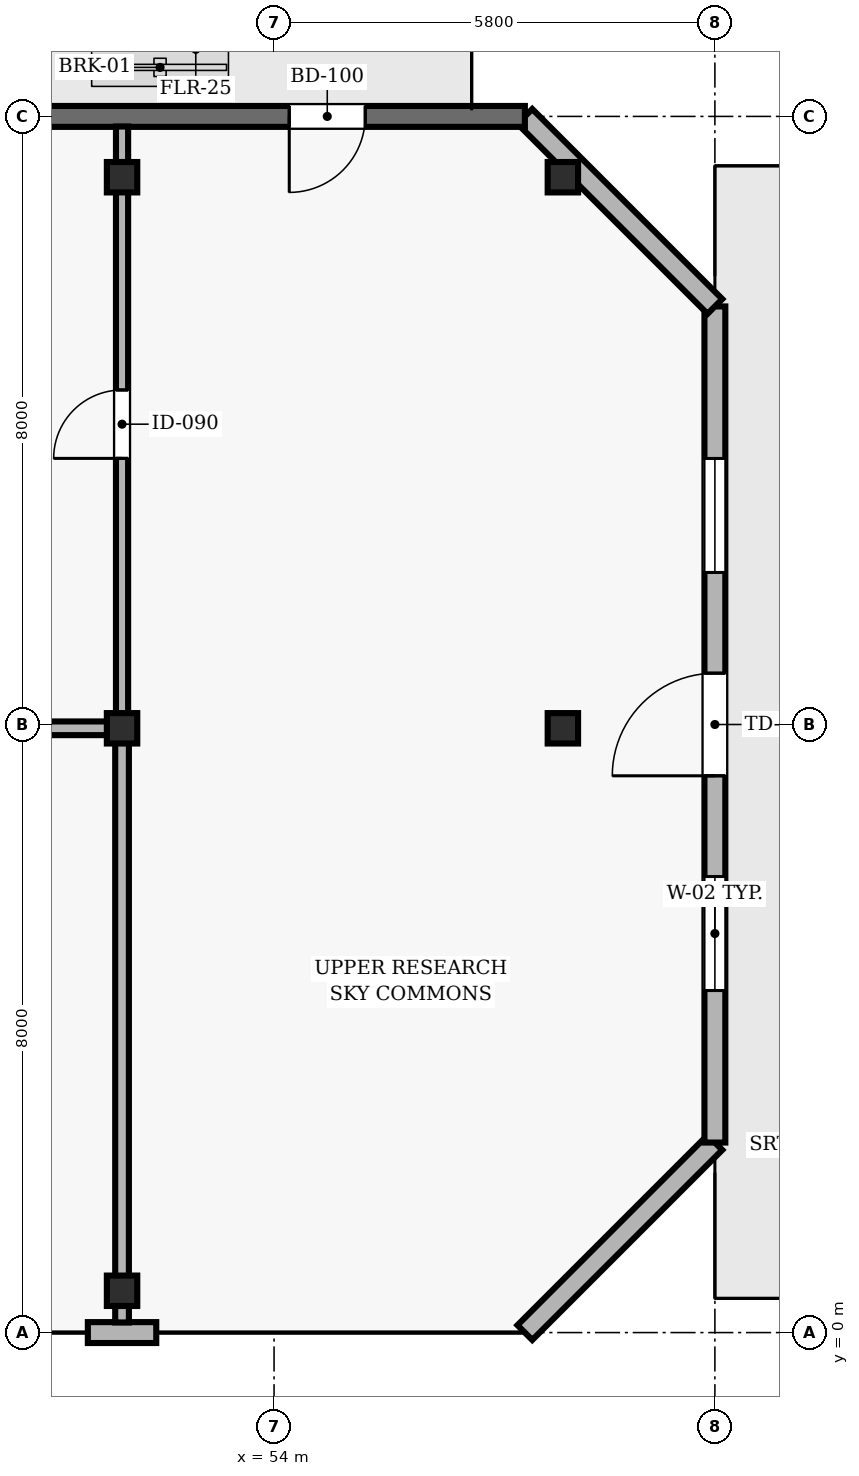
"""IFC4 building model, lengths in metres.
Left out: names, types, materials, properties, quantities, classifications, styles, units other than length and angle.
Written with IfcOpenShell. Run it as: python <this file> out.ifc"""

import sys

from ifc_helpers import new_model, si_unit, direction, frame, frame_2d, origin, origin_2d, place, context, subcontext, project, spatial, rectangle, hollow_rectangle, extrude, element, fill, save


model = new_model("IFC4")
c1 = context("Model", 3, precision=1e-05, world=origin(), true_north=direction((0.0, 1.0)))
c2 = subcontext(c1, "Body", "Model", "MODEL_VIEW")
j1 = project(units=[si_unit("LENGTHUNIT", "METRE"), si_unit("PLANEANGLEUNIT", "RADIAN")], contexts=[c1])
p1 = place(None, origin())
s1 = spatial("IfcSite", under=j1, at=p1, CompositionType="ELEMENT")
p2 = place(p1, origin())
s2 = spatial("IfcBuilding", under=s1, at=p2, CompositionType="ELEMENT")
p3 = place(p2, frame((0.0, 0.0, 243.2)))
s3 = spatial("IfcBuildingStorey", under=s2, at=p3, CompositionType="ELEMENT", Elevation=243.2)
for number, where, z_axis, x_axis in (
    (1, (52.0, 0.55, 0.0), (0.0, 0.0, 1.0), (1.0, 0.0, 0.0)),
    (2, (52.0, 7.95, 0.0), (0.0, 0.0, 1.0), (1.0, 0.0, 0.0)),
    (3, (52.0, 15.2, 0.0), (0.0, 0.0, 1.0), (1.0, 0.0, 0.0)),
    (4, (57.8, 7.95, 0.0), (0.0, 0.0, 1.0), (1.0, 0.0, 0.0)),
    (5, (57.8, 15.2, 0.0), (0.0, 0.0, 1.0), (1.0, 0.0, 0.0)),
):
    element("IfcColumn", number, at=place(p3, frame(where, z_axis=z_axis, x_axis=x_axis)), inside=s3, PredefinedType="COLUMN", context=c2, shape_type="SweptSolid", body=[
        extrude(hollow_rectangle(XDim=0.4, YDim=0.4, WallThickness=0.02, at=origin_2d()), origin(), (0.0, 0.0, 1.0), 5.0),
    ])
p4 = place(p3, frame((51.55, 0.0, 0.0), z_axis=(0.0, 0.0, 1.0), x_axis=(1.0, 0.0, 0.0)))
e6 = element("IfcWall", 6, at=p4, inside=s3, PredefinedType="SOLIDWALL", context=c2, shape_type="SweptSolid", body=[
    extrude(rectangle(XDim=0.9, YDim=0.275, at=frame_2d((0.45, 0.0))), origin(), (0.0, 0.0, 1.0), 4.79),
])
p5 = place(p3, frame((57.3, 0.0, 0.0), z_axis=(0.0, 0.0, 1.0), x_axis=(0.707106781187, 0.707106781187, 0.0)))
e7 = element("IfcWall", 7, at=p5, inside=s3, PredefinedType="SOLIDWALL", context=c2, shape_type="SweptSolid", body=[
    extrude(rectangle(XDim=3.536, YDim=0.275, at=frame_2d((1.768, 0.0))), origin(), (0.0, 0.0, 1.0), 4.79),
])
p6 = place(p3, frame((59.8, 2.5, 0.0), z_axis=(0.0, 0.0, 1.0), x_axis=(0.0, 1.0, 0.0)))
e8 = element("IfcWall", 8, at=p6, inside=s3, PredefinedType="SOLIDWALL", context=c2, shape_type="SweptSolid", body=[
    extrude(rectangle(XDim=11.0, YDim=0.275, at=frame_2d((5.5, 0.0))), origin(), (0.0, 0.0, 1.0), 4.79),
])
p7 = place(p6, frame((4.825, 0.0, 0.0)))
e9 = element("IfcOpeningElement", 9, at=p7, cuts=e8, PredefinedType="OPENING", context=c2, shape_type="SweptSolid", body=[
    extrude(rectangle(XDim=1.35, YDim=2.2, at=frame_2d((0.675, 1.1))), frame((0.0, 0.147, 0.0), z_axis=(0.0, -1.0, 0.0), x_axis=(1.0, 0.0, 0.0)), (0.0, 0.0, 1.0), 0.295),
])
p8 = place(p6, frame((2.0, 0.0, 0.9)))
e10 = element("IfcOpeningElement", 10, at=p8, cuts=e8, PredefinedType="OPENING", context=c2, shape_type="SweptSolid", body=[
    extrude(rectangle(XDim=1.5, YDim=1.6, at=frame_2d((0.75, 0.8))), frame((0.0, 0.147, 0.0), z_axis=(0.0, -1.0, 0.0), x_axis=(1.0, 0.0, 0.0)), (0.0, 0.0, 1.0), 0.295),
])
p9 = place(p6, frame((7.5, 0.0, 0.9)))
e11 = element("IfcOpeningElement", 11, at=p9, cuts=e8, PredefinedType="OPENING", context=c2, shape_type="SweptSolid", body=[
    extrude(rectangle(XDim=1.5, YDim=1.6, at=frame_2d((0.75, 0.8))), frame((0.0, 0.147, 0.0), z_axis=(0.0, -1.0, 0.0), x_axis=(1.0, 0.0, 0.0)), (0.0, 0.0, 1.0), 0.295),
])
p10 = place(p3, frame((59.8, 13.5, 0.0), z_axis=(0.0, 0.0, 1.0), x_axis=(-0.707106781187, 0.707106781187, 0.0)))
e12 = element("IfcWall", 12, at=p10, inside=s3, PredefinedType="SOLIDWALL", context=c2, shape_type="SweptSolid", body=[
    extrude(rectangle(XDim=3.536, YDim=0.275, at=frame_2d((1.768, 0.0))), origin(), (0.0, 0.0, 1.0), 4.79),
])
p11 = place(p3, frame((57.3, 16.0, 0.0), z_axis=(0.0, 0.0, 1.0), x_axis=(-1.0, 0.0, 0.0)))
e13 = element("IfcWall", 13, at=p11, inside=s3, PredefinedType="SOLIDWALL", context=c2, shape_type="SweptSolid", body=[
    extrude(rectangle(XDim=9.8, YDim=0.275, at=frame_2d((4.9, 0.0))), origin(), (0.0, 0.0, 1.0), 4.79),
])
p12 = place(p11, frame((2.1, 0.0, 0.0)))
e14 = element("IfcOpeningElement", 14, at=p12, cuts=e13, PredefinedType="OPENING", context=c2, shape_type="SweptSolid", body=[
    extrude(rectangle(XDim=1.0, YDim=2.2, at=frame_2d((0.5, 1.1))), frame((0.0, 0.147, 0.0), z_axis=(0.0, -1.0, 0.0), x_axis=(1.0, 0.0, 0.0)), (0.0, 0.0, 1.0), 0.295),
])
p13 = place(p3, frame((38.05, 7.95, 0.0), z_axis=(0.0, 0.0, 1.0), x_axis=(1.0, 0.0, 0.0)))
e15 = element("IfcWall", 15, at=p13, inside=s3, PredefinedType="PARTITIONING", context=c2, shape_type="SweptSolid", body=[
    extrude(rectangle(XDim=13.95, YDim=0.18, at=frame_2d((6.975, 0.0))), origin(), (0.0, 0.0, 1.0), 4.327),
])
p14 = place(p13, frame((5.45, 0.0, 0.0)))
e16 = element("IfcOpeningElement", 16, at=p14, cuts=e15, PredefinedType="OPENING", context=c2, shape_type="SweptSolid", body=[
    extrude(rectangle(XDim=0.95, YDim=2.1, at=frame_2d((0.475, 1.05))), frame((0.0, 0.1, 0.0), z_axis=(0.0, -1.0, 0.0), x_axis=(1.0, 0.0, 0.0)), (0.0, 0.0, 1.0), 0.2),
])
p15 = place(p3, frame((52.0, 7.865, 0.0), z_axis=(0.0, 0.0, 1.0), x_axis=(0.0, -1.0, 0.0)))
e17 = element("IfcWall", 17, at=p15, inside=s3, PredefinedType="PARTITIONING", context=c2, shape_type="SweptSolid", body=[
    extrude(rectangle(XDim=7.732, YDim=0.18, at=frame_2d((3.866, 0.0))), origin(), (0.0, 0.0, 1.0), 4.327),
])
p16 = place(p3, frame((52.0, 8.035, 0.0), z_axis=(0.0, 0.0, 1.0), x_axis=(0.0, 1.0, 0.0)))
e18 = element("IfcWall", 18, at=p16, inside=s3, PredefinedType="PARTITIONING", context=c2, shape_type="SweptSolid", body=[
    extrude(rectangle(XDim=7.832, YDim=0.16, at=frame_2d((3.916, 0.0))), origin(), (0.0, 0.0, 1.0), 4.327),
])
p17 = place(p16, frame((3.466, 0.0, 0.0)))
e19 = element("IfcOpeningElement", 19, at=p17, cuts=e18, PredefinedType="OPENING", context=c2, shape_type="SweptSolid", body=[
    extrude(rectangle(XDim=0.9, YDim=2.1, at=frame_2d((0.45, 1.05))), frame((0.0, 0.09, 0.0), z_axis=(0.0, -1.0, 0.0), x_axis=(1.0, 0.0, 0.0)), (0.0, 0.0, 1.0), 0.18),
])
p18 = place(p7, origin())
e20 = element("IfcDoor", 20, at=p18, inside=s3, OperationType="SINGLE_SWING_LEFT", PredefinedType="DOOR", context=c2, shape_type="SweptSolid", body=[
    extrude(rectangle(XDim=1.35, YDim=2.2, at=frame_2d((0.675, 1.1))), frame((0.0, 0.025, 0.0), z_axis=(0.0, -1.0, 0.0), x_axis=(1.0, 0.0, 0.0)), (0.0, 0.0, 1.0), 0.05),
])
fill(e9, e20)
p19 = place(p8, origin())
e21 = element("IfcWindow", 21, at=p19, inside=s3, PartitioningType="SINGLE_PANEL", PredefinedType="WINDOW", context=c2, shape_type="SweptSolid", body=[
    extrude(rectangle(XDim=1.5, YDim=1.6, at=frame_2d((0.75, 0.8))), frame((0.0, 0.03, 0.0), z_axis=(0.0, -1.0, 0.0), x_axis=(1.0, 0.0, 0.0)), (0.0, 0.0, 1.0), 0.06),
])
fill(e10, e21)
p20 = place(p9, origin())
e22 = element("IfcWindow", 22, at=p20, inside=s3, PartitioningType="SINGLE_PANEL", PredefinedType="WINDOW", context=c2, shape_type="SweptSolid", body=[
    extrude(rectangle(XDim=1.5, YDim=1.6, at=frame_2d((0.75, 0.8))), frame((0.0, 0.03, 0.0), z_axis=(0.0, -1.0, 0.0), x_axis=(1.0, 0.0, 0.0)), (0.0, 0.0, 1.0), 0.06),
])
fill(e11, e22)
p21 = place(p12, origin())
e23 = element("IfcDoor", 23, at=p21, inside=s3, OperationType="SINGLE_SWING_RIGHT", PredefinedType="DOOR", context=c2, shape_type="SweptSolid", body=[
    extrude(rectangle(XDim=1.0, YDim=2.2, at=frame_2d((0.5, 1.1))), frame((0.0, 0.025, 0.0), z_axis=(0.0, -1.0, 0.0), x_axis=(1.0, 0.0, 0.0)), (0.0, 0.0, 1.0), 0.05),
])
fill(e14, e23)
p22 = place(p17, origin())
e24 = element("IfcDoor", 24, at=p22, inside=s3, OperationType="SINGLE_SWING_LEFT", PredefinedType="DOOR", context=c2, shape_type="SweptSolid", body=[
    extrude(rectangle(XDim=0.9, YDim=2.1, at=frame_2d((0.45, 1.05))), frame((0.0, 0.025, 0.0), z_axis=(0.0, -1.0, 0.0), x_axis=(1.0, 0.0, 0.0)), (0.0, 0.0, 1.0), 0.05),
])
fill(e19, e24)
save(model, sys.argv[1])
